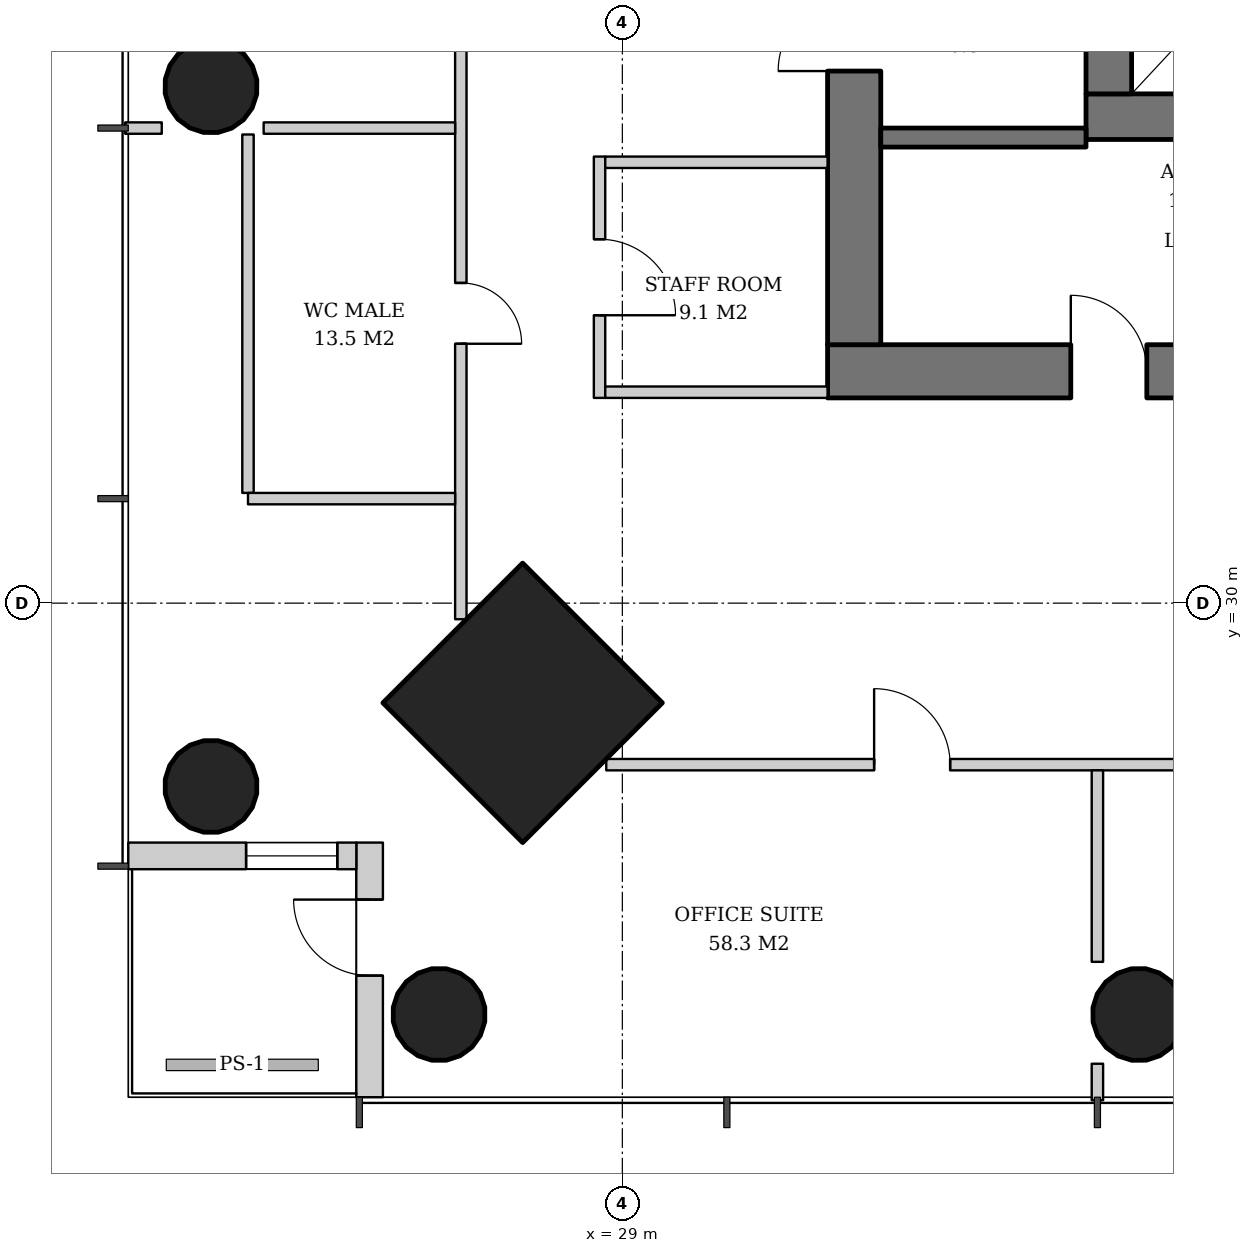
"""IFC4 building model, lengths in metres.
Left out: names, types, materials, properties, quantities, classifications, styles, units other than length and angle.
Written with IfcOpenShell. Run it as: python <this file> out.ifc"""

import sys

from ifc_helpers import new_model, si_unit, direction, frame, frame_2d, origin, origin_2d, place, context, subcontext, project, spatial, rectangle, hollow_circle, extrude, element, fill, save


model = new_model("IFC4")
c1 = context("Model", 3, precision=1e-05, world=origin(), true_north=direction((0.0, 1.0)))
c2 = subcontext(c1, "Body", "Model", "MODEL_VIEW")
j1 = project(units=[si_unit("LENGTHUNIT", "METRE"), si_unit("PLANEANGLEUNIT", "RADIAN")], contexts=[c1])
p1 = place(None, origin())
s1 = spatial("IfcSite", under=j1, at=p1, CompositionType="ELEMENT")
p2 = place(p1, origin())
s2 = spatial("IfcBuilding", under=s1, at=p2, CompositionType="ELEMENT")
p3 = place(p2, frame((0.0, 0.0, 100.8)))
s3 = spatial("IfcBuildingStorey", under=s2, at=p3, CompositionType="ELEMENT", Elevation=100.8)
p4 = place(p3, frame((27.65, 28.65, 0.0), z_axis=(0.031962158256, 0.031962158256, 0.998977898093), x_axis=(-0.707106781187, 0.707106781187, 0.0)))
e1 = element("IfcColumn", 1, at=p4, inside=s3, PredefinedType="COLUMN", context=c2, shape_type="SweptSolid", body=[
    extrude(rectangle(XDim=2.6, YDim=2.6, at=origin_2d()), origin(), (0.0, 0.0, 1.0), 3.804),
])
p5 = place(p3, frame((23.55, 27.55, 0.0), z_axis=(0.031898107953, 0.031898107953, 0.998981992539), x_axis=(-0.707106781187, 0.707106781187, 0.0)))
e2 = element("IfcColumn", 2, at=p5, inside=s3, PredefinedType="COLUMN", context=c2, shape_type="SweptSolid", body=[
    extrude(hollow_circle(Radius=0.61, WallThickness=0.04, at=origin_2d()), origin(), (0.0, 0.0, 1.0), 3.804),
])
p6 = place(p3, frame((23.55, 36.775, 0.0), z_axis=(0.031910269556, 0.015987237665, 0.999362868496), x_axis=(-0.447933021895, 0.894067115991, 0.0)))
e3 = element("IfcColumn", 3, at=p6, inside=s3, PredefinedType="COLUMN", context=c2, shape_type="SweptSolid", body=[
    extrude(hollow_circle(Radius=0.61, WallThickness=0.04, at=origin_2d()), origin(), (0.0, 0.0, 1.0), 3.802),
])
p7 = place(p3, frame((26.55, 24.55, 0.0), z_axis=(0.031898107953, 0.031898107953, 0.998981992539), x_axis=(-0.707106781187, 0.707106781187, 0.0)))
e4 = element("IfcColumn", 4, at=p7, inside=s3, PredefinedType="COLUMN", context=c2, shape_type="SweptSolid", body=[
    extrude(hollow_circle(Radius=0.61, WallThickness=0.04, at=origin_2d()), origin(), (0.0, 0.0, 1.0), 3.804),
])
p8 = place(p3, frame((35.775, 24.55, 0.0), z_axis=(0.015987237665, 0.031910269556, 0.999362868496), x_axis=(-0.894067115991, 0.447933021895, 0.0)))
e5 = element("IfcColumn", 5, at=p8, inside=s3, PredefinedType="COLUMN", context=c2, shape_type="SweptSolid", body=[
    extrude(hollow_circle(Radius=0.61, WallThickness=0.04, at=origin_2d()), origin(), (0.0, 0.0, 1.0), 3.802),
])
p9 = place(p3, frame((35.1, 36.4, 0.0), z_axis=(0.0, 0.0, 1.0), x_axis=(1.0, 0.0, 0.0)))
e6 = element("IfcWall", 6, at=p9, inside=s3, PredefinedType="SHEAR", context=c2, shape_type="SweptSolid", body=[
    extrude(rectangle(XDim=19.8, YDim=0.6, at=frame_2d((9.9, 0.0))), origin(), (0.0, 0.0, 1.0), 3.8),
])
p10 = place(p9, frame((3.9, 0.0, 0.0)))
e7 = element("IfcOpeningElement", 7, at=p10, cuts=e6, PredefinedType="OPENING", context=c2, shape_type="SweptSolid", body=[
    extrude(rectangle(XDim=1.0, YDim=2.1, at=frame_2d((0.5, 1.05))), frame((0.0, 0.31, 0.0), z_axis=(0.0, -1.0, 0.0), x_axis=(1.0, 0.0, 0.0)), (0.0, 0.0, 1.0), 0.62),
])
p11 = place(p9, frame((15.35, 0.0, 0.0)))
e8 = element("IfcOpeningElement", 8, at=p11, cuts=e6, PredefinedType="OPENING", context=c2, shape_type="SweptSolid", body=[
    extrude(rectangle(XDim=1.0, YDim=2.1, at=frame_2d((0.5, 1.05))), frame((0.0, 0.31, 0.0), z_axis=(0.0, -1.0, 0.0), x_axis=(1.0, 0.0, 0.0)), (0.0, 0.0, 1.0), 0.62),
])
p12 = place(p3, frame((35.4, 36.7, 0.0), z_axis=(0.0, 0.0, 1.0), x_axis=(0.0, 1.0, 0.0)))
e9 = element("IfcWall", 9, at=p12, inside=s3, PredefinedType="SHEAR", context=c2, shape_type="SweptSolid", body=[
    extrude(rectangle(XDim=18.6, YDim=0.6, at=frame_2d((9.3, 0.0))), origin(), (0.0, 0.0, 1.0), 3.8),
])
p13 = place(p12, frame((8.4, 0.0, 0.0)))
e10 = element("IfcOpeningElement", 10, at=p13, cuts=e9, PredefinedType="OPENING", context=c2, shape_type="SweptSolid", body=[
    extrude(rectangle(XDim=1.8, YDim=2.4, at=frame_2d((0.9, 1.2))), frame((0.0, 0.31, 0.0), z_axis=(0.0, -1.0, 0.0), x_axis=(1.0, 0.0, 0.0)), (0.0, 0.0, 1.0), 0.62),
])
p14 = place(p3, frame((31.7, 33.05, 0.0), z_axis=(0.0, 0.0, 1.0), x_axis=(1.0, 0.0, 0.0)))
e11 = element("IfcWall", 11, at=p14, inside=s3, PredefinedType="SHEAR", context=c2, shape_type="SweptSolid", body=[
    extrude(rectangle(XDim=26.6, YDim=0.7, at=frame_2d((13.3, 0.0))), origin(), (0.0, 0.0, 1.0), 3.8),
])
p15 = place(p14, frame((7.3, 0.0, 0.0)))
e12 = element("IfcOpeningElement", 12, at=p15, cuts=e11, PredefinedType="OPENING", context=c2, shape_type="SweptSolid", body=[
    extrude(rectangle(XDim=1.0, YDim=2.1, at=frame_2d((0.5, 1.05))), frame((0.0, 0.36, 0.0), z_axis=(0.0, -1.0, 0.0), x_axis=(1.0, 0.0, 0.0)), (0.0, 0.0, 1.0), 0.72),
])
p16 = place(p14, frame((18.75, 0.0, 0.0)))
e13 = element("IfcOpeningElement", 13, at=p16, cuts=e11, PredefinedType="OPENING", context=c2, shape_type="SweptSolid", body=[
    extrude(rectangle(XDim=1.0, YDim=2.1, at=frame_2d((0.5, 1.05))), frame((0.0, 0.36, 0.0), z_axis=(0.0, -1.0, 0.0), x_axis=(1.0, 0.0, 0.0)), (0.0, 0.0, 1.0), 0.72),
])
p17 = place(p14, frame((3.2, 0.0, 0.0)))
e14 = element("IfcOpeningElement", 14, at=p17, cuts=e11, PredefinedType="OPENING", context=c2, shape_type="SweptSolid", body=[
    extrude(rectangle(XDim=1.0, YDim=2.1, at=frame_2d((0.5, 1.05))), frame((0.0, 0.36, 0.0), z_axis=(0.0, -1.0, 0.0), x_axis=(1.0, 0.0, 0.0)), (0.0, 0.0, 1.0), 0.72),
])
p18 = place(p14, frame((10.42, 0.0, 0.0)))
e15 = element("IfcOpeningElement", 15, at=p18, cuts=e11, PredefinedType="OPENING", context=c2, shape_type="SweptSolid", body=[
    extrude(rectangle(XDim=1.0, YDim=2.1, at=frame_2d((0.5, 1.05))), frame((0.0, 0.36, 0.0), z_axis=(0.0, -1.0, 0.0), x_axis=(1.0, 0.0, 0.0)), (0.0, 0.0, 1.0), 0.72),
])
p19 = place(p14, frame((14.46, 0.0, 0.0)))
e16 = element("IfcOpeningElement", 16, at=p19, cuts=e11, PredefinedType="OPENING", context=c2, shape_type="SweptSolid", body=[
    extrude(rectangle(XDim=1.0, YDim=2.1, at=frame_2d((0.5, 1.05))), frame((0.0, 0.36, 0.0), z_axis=(0.0, -1.0, 0.0), x_axis=(1.0, 0.0, 0.0)), (0.0, 0.0, 1.0), 0.72),
])
p20 = place(p14, frame((22.5, 0.0, 0.0)))
e17 = element("IfcOpeningElement", 17, at=p20, cuts=e11, PredefinedType="OPENING", context=c2, shape_type="SweptSolid", body=[
    extrude(rectangle(XDim=1.0, YDim=2.1, at=frame_2d((0.5, 1.05))), frame((0.0, 0.36, 0.0), z_axis=(0.0, -1.0, 0.0), x_axis=(1.0, 0.0, 0.0)), (0.0, 0.0, 1.0), 0.72),
])
p21 = place(p3, frame((32.05, 33.4, 0.0), z_axis=(0.0, 0.0, 1.0), x_axis=(0.0, 1.0, 0.0)))
e18 = element("IfcWall", 18, at=p21, inside=s3, PredefinedType="SHEAR", context=c2, shape_type="SweptSolid", body=[
    extrude(rectangle(XDim=25.2, YDim=0.7, at=frame_2d((12.6, 0.0))), origin(), (0.0, 0.0, 1.0), 3.8),
])
p22 = place(p21, frame((11.7, 0.0, 0.0)))
e19 = element("IfcOpeningElement", 19, at=p22, cuts=e18, PredefinedType="OPENING", context=c2, shape_type="SweptSolid", body=[
    extrude(rectangle(XDim=1.8, YDim=2.4, at=frame_2d((0.9, 1.2))), frame((0.0, 0.36, 0.0), z_axis=(0.0, -1.0, 0.0), x_axis=(1.0, 0.0, 0.0)), (0.0, 0.0, 1.0), 0.72),
])
p23 = place(p21, frame((3.6, 0.0, 0.0)))
e20 = element("IfcOpeningElement", 20, at=p23, cuts=e18, PredefinedType="OPENING", context=c2, shape_type="SweptSolid", body=[
    extrude(rectangle(XDim=1.0, YDim=2.1, at=frame_2d((0.5, 1.05))), frame((0.0, 0.36, 0.0), z_axis=(0.0, -1.0, 0.0), x_axis=(1.0, 0.0, 0.0)), (0.0, 0.0, 1.0), 0.72),
])
p24 = place(p21, frame((6.35, 0.0, 0.0)))
e21 = element("IfcOpeningElement", 21, at=p24, cuts=e18, PredefinedType="OPENING", context=c2, shape_type="SweptSolid", body=[
    extrude(rectangle(XDim=1.0, YDim=2.1, at=frame_2d((0.5, 1.05))), frame((0.0, 0.36, 0.0), z_axis=(0.0, -1.0, 0.0), x_axis=(1.0, 0.0, 0.0)), (0.0, 0.0, 1.0), 0.72),
])
p25 = place(p21, frame((9.1, 0.0, 0.0)))
e22 = element("IfcOpeningElement", 22, at=p25, cuts=e18, PredefinedType="OPENING", context=c2, shape_type="SweptSolid", body=[
    extrude(rectangle(XDim=1.0, YDim=2.1, at=frame_2d((0.5, 1.05))), frame((0.0, 0.36, 0.0), z_axis=(0.0, -1.0, 0.0), x_axis=(1.0, 0.0, 0.0)), (0.0, 0.0, 1.0), 0.72),
])
p26 = place(p21, frame((15.1, 0.0, 0.0)))
e23 = element("IfcOpeningElement", 23, at=p26, cuts=e18, PredefinedType="OPENING", context=c2, shape_type="SweptSolid", body=[
    extrude(rectangle(XDim=1.0, YDim=2.1, at=frame_2d((0.5, 1.05))), frame((0.0, 0.36, 0.0), z_axis=(0.0, -1.0, 0.0), x_axis=(1.0, 0.0, 0.0)), (0.0, 0.0, 1.0), 0.72),
])
p27 = place(p21, frame((17.85, 0.0, 0.0)))
e24 = element("IfcOpeningElement", 24, at=p27, cuts=e18, PredefinedType="OPENING", context=c2, shape_type="SweptSolid", body=[
    extrude(rectangle(XDim=1.0, YDim=2.1, at=frame_2d((0.5, 1.05))), frame((0.0, 0.36, 0.0), z_axis=(0.0, -1.0, 0.0), x_axis=(1.0, 0.0, 0.0)), (0.0, 0.0, 1.0), 0.72),
])
p28 = place(p3, frame((25.675, 23.5, 0.0), z_axis=(0.0, 0.0, 1.0), x_axis=(0.0, 1.0, 0.0)))
e25 = element("IfcWall", 25, at=p28, inside=s3, PredefinedType="SOLIDWALL", context=c2, shape_type="SweptSolid", body=[
    extrude(rectangle(XDim=3.35, YDim=0.35, at=frame_2d((1.675, 0.0))), origin(), (0.0, 0.0, 1.0), 3.62),
])
p29 = place(p28, frame((1.6, 0.0, 0.0)))
e26 = element("IfcOpeningElement", 26, at=p29, cuts=e25, PredefinedType="OPENING", context=c2, shape_type="SweptSolid", body=[
    extrude(rectangle(XDim=1.0, YDim=2.4, at=frame_2d((0.5, 1.2))), frame((0.0, 0.185, 0.0), z_axis=(0.0, -1.0, 0.0), x_axis=(1.0, 0.0, 0.0)), (0.0, 0.0, 1.0), 0.37),
])
p30 = place(p3, frame((25.5, 26.675, 0.0), z_axis=(0.0, 0.0, 1.0), x_axis=(-1.0, 0.0, 0.0)))
e27 = element("IfcWall", 27, at=p30, inside=s3, PredefinedType="SOLIDWALL", context=c2, shape_type="SweptSolid", body=[
    extrude(rectangle(XDim=3.0, YDim=0.35, at=frame_2d((1.5, 0.0))), origin(), (0.0, 0.0, 1.0), 3.62),
])
p31 = place(p30, frame((0.25, 0.0, 0.6)))
e28 = element("IfcOpeningElement", 28, at=p31, cuts=e27, PredefinedType="OPENING", context=c2, shape_type="SweptSolid", body=[
    extrude(rectangle(XDim=1.2, YDim=2.55, at=frame_2d((0.6, 1.275))), frame((0.0, 0.185, 0.0), z_axis=(0.0, -1.0, 0.0), x_axis=(1.0, 0.0, 0.0)), (0.0, 0.0, 1.0), 0.37),
])
p32 = place(p3, frame((32.4, 36.125, 0.0), z_axis=(0.0, 0.0, 1.0), x_axis=(1.0, 0.0, 0.0)))
e29 = element("IfcWall", 29, at=p32, inside=s3, PredefinedType="SHEAR", context=c2, shape_type="SweptSolid", body=[
    extrude(rectangle(XDim=2.7, YDim=0.25, at=frame_2d((1.35, 0.0))), origin(), (0.0, 0.0, 1.0), 3.8),
])
p33 = place(p3, frame((28.7, 35.875, 0.0), z_axis=(0.0, 0.0, 1.0), x_axis=(0.0, -1.0, 0.0)))
e30 = element("IfcWall", 30, at=p33, inside=s3, PredefinedType="PARTITIONING", context=c2, shape_type="SweptSolid", body=[
    extrude(rectangle(XDim=3.175, YDim=0.15, at=frame_2d((1.587, 0.0))), origin(), (0.0, 0.0, 1.0), 3.62),
])
p34 = place(p33, frame((1.087, 0.0, 0.0)))
e31 = element("IfcOpeningElement", 31, at=p34, cuts=e30, PredefinedType="OPENING", context=c2, shape_type="SweptSolid", body=[
    extrude(rectangle(XDim=1.0, YDim=2.1, at=frame_2d((0.5, 1.05))), frame((0.0, 0.085, 0.0), z_axis=(0.0, -1.0, 0.0), x_axis=(1.0, 0.0, 0.0)), (0.0, 0.0, 1.0), 0.17),
])
for number, where, z_axis, x_axis in (
    (32, (31.7, 35.8, 0.0), (0.0, 0.0, 1.0), (-1.0, 0.0, 0.0)),
    (33, (31.7, 32.775, 0.0), (0.0, 0.0, 1.0), (-1.0, 0.0, 0.0)),
):
    element("IfcWall", number, at=place(p3, frame(where, z_axis=z_axis, x_axis=x_axis)), inside=s3, PredefinedType="PARTITIONING", context=c2, shape_type="SweptSolid", body=[
        extrude(rectangle(XDim=2.925, YDim=0.15, at=frame_2d((1.462, 0.0))), origin(), (0.0, 0.0, 1.0), 3.62),
    ])
p35 = place(p3, frame((24.075, 36.166, 0.0), z_axis=(0.0, 0.0, 1.0), x_axis=(0.0, -1.0, 0.0)))
e34 = element("IfcWall", 34, at=p35, inside=s3, PredefinedType="PARTITIONING", context=c2, shape_type="SweptSolid", body=[
    extrude(rectangle(XDim=4.716, YDim=0.15, at=frame_2d((2.358, 0.0))), origin(), (0.0, 0.0, 1.0), 3.62),
])
p36 = place(p3, frame((26.875, 62.211, 0.0), z_axis=(0.0, 0.0, 1.0), x_axis=(0.0, -1.0, 0.0)))
e35 = element("IfcWall", 35, at=p36, inside=s3, PredefinedType="PARTITIONING", context=c2, shape_type="SweptSolid", body=[
    extrude(rectangle(XDim=32.423, YDim=0.15, at=frame_2d((16.211, 0.0))), origin(), (0.0, 0.0, 1.0), 2.72),
])
p37 = place(p36, frame((3.524, 0.0, 0.0)))
e36 = element("IfcOpeningElement", 36, at=p37, cuts=e35, PredefinedType="OPENING", context=c2, shape_type="SweptSolid", body=[
    extrude(rectangle(XDim=1.0, YDim=2.1, at=frame_2d((0.5, 1.05))), frame((0.0, 0.085, 0.0), z_axis=(0.0, -1.0, 0.0), x_axis=(1.0, 0.0, 0.0)), (0.0, 0.0, 1.0), 0.17),
])
p38 = place(p36, frame((8.399, 0.0, 0.0)))
e37 = element("IfcOpeningElement", 37, at=p38, cuts=e35, PredefinedType="OPENING", context=c2, shape_type="SweptSolid", body=[
    extrude(rectangle(XDim=1.0, YDim=2.1, at=frame_2d((0.5, 1.05))), frame((0.0, 0.085, 0.0), z_axis=(0.0, -1.0, 0.0), x_axis=(1.0, 0.0, 0.0)), (0.0, 0.0, 1.0), 0.17),
])
p39 = place(p36, frame((13.274, 0.0, 0.0)))
e38 = element("IfcOpeningElement", 38, at=p39, cuts=e35, PredefinedType="OPENING", context=c2, shape_type="SweptSolid", body=[
    extrude(rectangle(XDim=1.0, YDim=2.1, at=frame_2d((0.5, 1.05))), frame((0.0, 0.085, 0.0), z_axis=(0.0, -1.0, 0.0), x_axis=(1.0, 0.0, 0.0)), (0.0, 0.0, 1.0), 0.17),
])
p40 = place(p36, frame((18.249, 0.0, 0.0)))
e39 = element("IfcOpeningElement", 39, at=p40, cuts=e35, PredefinedType="OPENING", context=c2, shape_type="SweptSolid", body=[
    extrude(rectangle(XDim=0.8, YDim=2.1, at=frame_2d((0.4, 1.05))), frame((0.0, 0.085, 0.0), z_axis=(0.0, -1.0, 0.0), x_axis=(1.0, 0.0, 0.0)), (0.0, 0.0, 1.0), 0.17),
])
p41 = place(p36, frame((23.024, 0.0, 0.0)))
e40 = element("IfcOpeningElement", 40, at=p41, cuts=e35, PredefinedType="OPENING", context=c2, shape_type="SweptSolid", body=[
    extrude(rectangle(XDim=1.0, YDim=2.1, at=frame_2d((0.5, 1.05))), frame((0.0, 0.085, 0.0), z_axis=(0.0, -1.0, 0.0), x_axis=(1.0, 0.0, 0.0)), (0.0, 0.0, 1.0), 0.17),
])
p42 = place(p36, frame((27.999, 0.0, 0.0)))
e41 = element("IfcOpeningElement", 41, at=p42, cuts=e35, PredefinedType="OPENING", context=c2, shape_type="SweptSolid", body=[
    extrude(rectangle(XDim=0.8, YDim=2.1, at=frame_2d((0.4, 1.05))), frame((0.0, 0.085, 0.0), z_axis=(0.0, -1.0, 0.0), x_axis=(1.0, 0.0, 0.0)), (0.0, 0.0, 1.0), 0.17),
])
p43 = place(p3, frame((26.8, 36.25, 0.0), z_axis=(0.0, 0.0, 1.0), x_axis=(-1.0, 0.0, 0.0)))
e42 = element("IfcWall", 42, at=p43, inside=s3, PredefinedType="PARTITIONING", context=c2, shape_type="SweptSolid", body=[
    extrude(rectangle(XDim=2.519, YDim=0.15, at=frame_2d((1.26, 0.0))), origin(), (0.0, 0.0, 1.0), 3.62),
])
p44 = place(p3, frame((22.94, 36.25, 0.0), z_axis=(0.0, 0.0, 1.0), x_axis=(-1.0, 0.0, 0.0)))
e43 = element("IfcWall", 43, at=p44, inside=s3, PredefinedType="PARTITIONING", context=c2, shape_type="SweptSolid", body=[
    extrude(rectangle(XDim=0.48, YDim=0.15, at=frame_2d((0.24, 0.0))), origin(), (0.0, 0.0, 1.0), 3.62),
])
p45 = place(p3, frame((26.8, 31.375, 0.0), z_axis=(0.0, 0.0, 1.0), x_axis=(-1.0, 0.0, 0.0)))
e44 = element("IfcWall", 44, at=p45, inside=s3, PredefinedType="PARTITIONING", context=c2, shape_type="SweptSolid", body=[
    extrude(rectangle(XDim=2.725, YDim=0.15, at=frame_2d((1.363, 0.0))), origin(), (0.0, 0.0, 1.0), 3.62),
])
p46 = place(p3, frame((28.789, 27.875, 0.0), z_axis=(0.0, 0.0, 1.0), x_axis=(1.0, 0.0, 0.0)))
e45 = element("IfcWall", 45, at=p46, inside=s3, PredefinedType="PARTITIONING", context=c2, shape_type="SweptSolid", body=[
    extrude(rectangle(XDim=32.423, YDim=0.15, at=frame_2d((16.211, 0.0))), origin(), (0.0, 0.0, 1.0), 2.72),
])
p47 = place(p46, frame((3.524, 0.0, 0.0)))
e46 = element("IfcOpeningElement", 46, at=p47, cuts=e45, PredefinedType="OPENING", context=c2, shape_type="SweptSolid", body=[
    extrude(rectangle(XDim=1.0, YDim=2.1, at=frame_2d((0.5, 1.05))), frame((0.0, 0.085, 0.0), z_axis=(0.0, -1.0, 0.0), x_axis=(1.0, 0.0, 0.0)), (0.0, 0.0, 1.0), 0.17),
])
p48 = place(p46, frame((8.399, 0.0, 0.0)))
e47 = element("IfcOpeningElement", 47, at=p48, cuts=e45, PredefinedType="OPENING", context=c2, shape_type="SweptSolid", body=[
    extrude(rectangle(XDim=1.0, YDim=2.1, at=frame_2d((0.5, 1.05))), frame((0.0, 0.085, 0.0), z_axis=(0.0, -1.0, 0.0), x_axis=(1.0, 0.0, 0.0)), (0.0, 0.0, 1.0), 0.17),
])
p49 = place(p46, frame((13.274, 0.0, 0.0)))
e48 = element("IfcOpeningElement", 48, at=p49, cuts=e45, PredefinedType="OPENING", context=c2, shape_type="SweptSolid", body=[
    extrude(rectangle(XDim=1.0, YDim=2.1, at=frame_2d((0.5, 1.05))), frame((0.0, 0.085, 0.0), z_axis=(0.0, -1.0, 0.0), x_axis=(1.0, 0.0, 0.0)), (0.0, 0.0, 1.0), 0.17),
])
p50 = place(p46, frame((23.024, 0.0, 0.0)))
e49 = element("IfcOpeningElement", 49, at=p50, cuts=e45, PredefinedType="OPENING", context=c2, shape_type="SweptSolid", body=[
    extrude(rectangle(XDim=1.0, YDim=2.1, at=frame_2d((0.5, 1.05))), frame((0.0, 0.085, 0.0), z_axis=(0.0, -1.0, 0.0), x_axis=(1.0, 0.0, 0.0)), (0.0, 0.0, 1.0), 0.17),
])
p51 = place(p3, frame((35.25, 27.8, 0.0), z_axis=(0.0, 0.0, 1.0), x_axis=(0.0, -1.0, 0.0)))
e50 = element("IfcWall", 50, at=p51, inside=s3, PredefinedType="PARTITIONING", context=c2, shape_type="SweptSolid", body=[
    extrude(rectangle(XDim=2.519, YDim=0.15, at=frame_2d((1.26, 0.0))), origin(), (0.0, 0.0, 1.0), 3.62),
])
p52 = place(p3, frame((35.25, 23.94, 0.0), z_axis=(0.0, 0.0, 1.0), x_axis=(0.0, -1.0, 0.0)))
e51 = element("IfcWall", 51, at=p52, inside=s3, PredefinedType="PARTITIONING", context=c2, shape_type="SweptSolid", body=[
    extrude(rectangle(XDim=0.48, YDim=0.15, at=frame_2d((0.24, 0.0))), origin(), (0.0, 0.0, 1.0), 3.62),
])
p53 = place(p29, origin())
e52 = element("IfcDoor", 52, at=p53, inside=s3, OperationType="SINGLE_SWING_RIGHT", PredefinedType="DOOR", context=c2, shape_type="SweptSolid", body=[
    extrude(rectangle(XDim=1.0, YDim=2.4, at=frame_2d((0.5, 1.2))), frame((0.0, 0.025, 0.0), z_axis=(0.0, -1.0, 0.0), x_axis=(1.0, 0.0, 0.0)), (0.0, 0.0, 1.0), 0.05),
])
fill(e26, e52)
p54 = place(p31, origin())
e53 = element("IfcWindow", 53, at=p54, inside=s3, PartitioningType="SINGLE_PANEL", PredefinedType="WINDOW", context=c2, shape_type="SweptSolid", body=[
    extrude(rectangle(XDim=1.2, YDim=2.55, at=frame_2d((0.6, 1.275))), frame((0.0, 0.03, 0.0), z_axis=(0.0, -1.0, 0.0), x_axis=(1.0, 0.0, 0.0)), (0.0, 0.0, 1.0), 0.06),
])
fill(e28, e53)
p55 = place(p23, origin())
e54 = element("IfcDoor", 54, at=p55, inside=s3, OperationType="SINGLE_SWING_LEFT", PredefinedType="DOOR", context=c2, shape_type="SweptSolid", body=[
    extrude(rectangle(XDim=1.0, YDim=2.1, at=frame_2d((0.5, 1.05))), frame((0.0, -0.29, 0.0), z_axis=(0.0, -1.0, 0.0), x_axis=(1.0, 0.0, 0.0)), (0.0, 0.0, 1.0), 0.05),
])
fill(e20, e54)
p56 = place(p17, origin())
e55 = element("IfcDoor", 55, at=p56, inside=s3, OperationType="SINGLE_SWING_LEFT", PredefinedType="DOOR", context=c2, shape_type="SweptSolid", body=[
    extrude(rectangle(XDim=1.0, YDim=2.1, at=frame_2d((0.5, 1.05))), frame((0.0, 0.34, 0.0), z_axis=(0.0, -1.0, 0.0), x_axis=(1.0, 0.0, 0.0)), (0.0, 0.0, 1.0), 0.05),
])
fill(e14, e55)
p57 = place(p34, origin())
e56 = element("IfcDoor", 56, at=p57, inside=s3, OperationType="SINGLE_SWING_RIGHT", PredefinedType="DOOR", context=c2, shape_type="SweptSolid", body=[
    extrude(rectangle(XDim=1.0, YDim=2.1, at=frame_2d((0.5, 1.05))), frame((0.0, 0.025, 0.0), z_axis=(0.0, -1.0, 0.0), x_axis=(1.0, 0.0, 0.0)), (0.0, 0.0, 1.0), 0.05),
])
fill(e31, e56)
p58 = place(p42, origin())
e57 = element("IfcDoor", 57, at=p58, inside=s3, OperationType="SINGLE_SWING_RIGHT", PredefinedType="DOOR", context=c2, shape_type="SweptSolid", body=[
    extrude(rectangle(XDim=0.8, YDim=2.1, at=frame_2d((0.4, 1.05))), frame((0.0, 0.025, 0.0), z_axis=(0.0, -1.0, 0.0), x_axis=(1.0, 0.0, 0.0)), (0.0, 0.0, 1.0), 0.05),
])
fill(e41, e57)
p59 = place(p47, origin())
e58 = element("IfcDoor", 58, at=p59, inside=s3, OperationType="SINGLE_SWING_LEFT", PredefinedType="DOOR", context=c2, shape_type="SweptSolid", body=[
    extrude(rectangle(XDim=1.0, YDim=2.1, at=frame_2d((0.5, 1.05))), frame((0.0, 0.025, 0.0), z_axis=(0.0, -1.0, 0.0), x_axis=(1.0, 0.0, 0.0)), (0.0, 0.0, 1.0), 0.05),
])
fill(e46, e58)
save(model, sys.argv[1])
